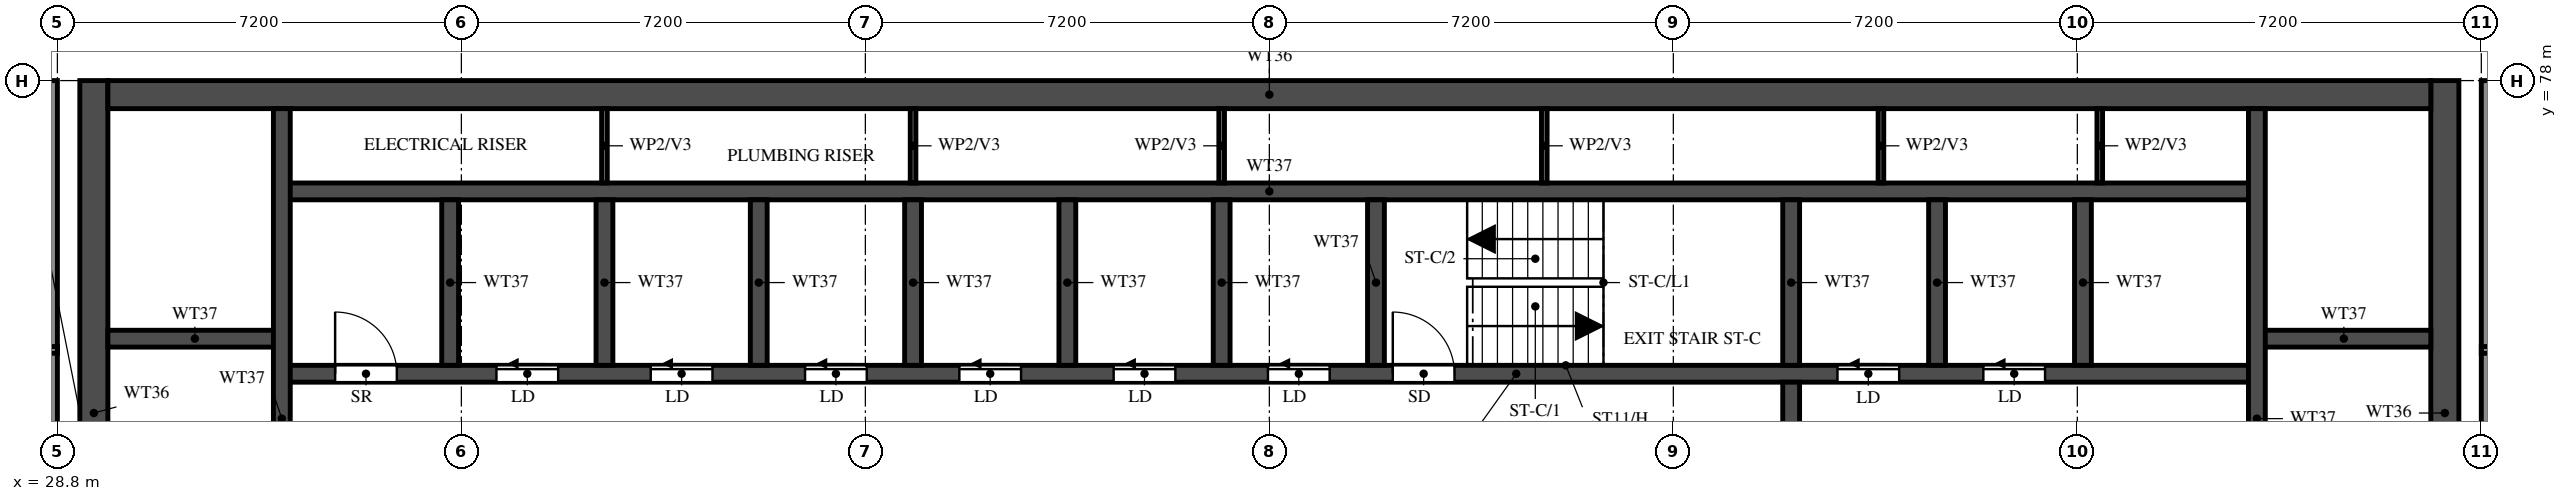
"""IFC4 building model, lengths in metres.
Left out: names, types, materials, properties, quantities, classifications, styles, units other than length and angle.
Written with IfcOpenShell. Run it as: python <this file> out.ifc"""

import sys

from ifc_helpers import new_model, si_unit, direction, frame, frame_2d, origin, place, context, subcontext, project, spatial, rectangle, extrude, element, fill, save


model = new_model("IFC4")
c1 = context("Model", 3, precision=1e-05, world=origin(), true_north=direction((0.0, 1.0)))
c2 = subcontext(c1, "Body", "Model", "MODEL_VIEW")
j1 = project(units=[si_unit("LENGTHUNIT", "METRE"), si_unit("PLANEANGLEUNIT", "RADIAN")], contexts=[c1])
p1 = place(None, origin())
s1 = spatial("IfcSite", under=j1, at=p1, CompositionType="ELEMENT")
p2 = place(p1, origin())
s2 = spatial("IfcBuilding", under=s1, at=p2, CompositionType="ELEMENT")
p3 = place(p2, frame((0.0, 0.0, 236.0)))
s3 = spatial("IfcBuildingStorey", under=s2, at=p3, CompositionType="ELEMENT", Elevation=236.0)
for number, where, z_axis, x_axis in (
    (1, (29.45, 66.15, 0.0), (0.0, 0.0, 1.0), (0.0, 1.0, 0.0)),
    (2, (71.35, 66.15, 0.0), (0.0, 0.0, 1.0), (0.0, 1.0, 0.0)),
):
    element("IfcWall", number, at=place(p3, frame(where, z_axis=z_axis, x_axis=x_axis)), inside=s3, PredefinedType="SHEAR", context=c2, shape_type="SweptSolid", body=[
        extrude(rectangle(XDim=11.85, YDim=0.5, at=frame_2d((5.925, 0.0))), origin(), (0.0, 0.0, 1.0), 3.22),
    ])
p4 = place(p3, frame((29.7, 77.75, 0.0), z_axis=(0.0, 0.0, 1.0), x_axis=(1.0, 0.0, 0.0)))
e3 = element("IfcWall", 3, at=p4, inside=s3, PredefinedType="SHEAR", context=c2, shape_type="SweptSolid", body=[
    extrude(rectangle(XDim=41.4, YDim=0.5, at=frame_2d((20.7, 0.0))), origin(), (0.0, 0.0, 1.0), 3.22),
])
p5 = place(p3, frame((32.8, 72.775, 0.0), z_axis=(0.0, 0.0, 1.0), x_axis=(1.0, 0.0, 0.0)))
e4 = element("IfcWall", 4, at=p5, inside=s3, PredefinedType="SHEAR", context=c2, shape_type="SweptSolid", body=[
    extrude(rectangle(XDim=35.2, YDim=0.3, at=frame_2d((17.6, 0.0))), origin(), (0.0, 0.0, 1.0), 3.22),
])
p6 = place(p5, frame((19.8, 0.0, 0.0)))
e5 = element("IfcOpeningElement", 5, at=p6, cuts=e4, PredefinedType="OPENING", context=c2, shape_type="SweptSolid", body=[
    extrude(rectangle(XDim=1.1, YDim=2.1, at=frame_2d((0.55, 1.05))), frame((0.0, 0.16, 0.0), z_axis=(0.0, -1.0, 0.0), x_axis=(1.0, 0.0, 0.0)), (0.0, 0.0, 1.0), 0.32),
])
p7 = place(p5, frame((27.725, 0.0, 0.0)))
e6 = element("IfcOpeningElement", 6, at=p7, cuts=e4, PredefinedType="OPENING", context=c2, shape_type="SweptSolid", body=[
    extrude(rectangle(XDim=1.1, YDim=2.1, at=frame_2d((0.55, 1.05))), frame((0.0, 0.16, 0.0), z_axis=(0.0, -1.0, 0.0), x_axis=(1.0, 0.0, 0.0)), (0.0, 0.0, 1.0), 0.32),
])
p8 = place(p5, frame((30.325, 0.0, 0.0)))
e7 = element("IfcOpeningElement", 7, at=p8, cuts=e4, PredefinedType="OPENING", context=c2, shape_type="SweptSolid", body=[
    extrude(rectangle(XDim=1.1, YDim=2.1, at=frame_2d((0.55, 1.05))), frame((0.0, 0.16, 0.0), z_axis=(0.0, -1.0, 0.0), x_axis=(1.0, 0.0, 0.0)), (0.0, 0.0, 1.0), 0.32),
])
p9 = place(p5, frame((3.825, 0.0, 0.0)))
e8 = element("IfcOpeningElement", 8, at=p9, cuts=e4, PredefinedType="OPENING", context=c2, shape_type="SweptSolid", body=[
    extrude(rectangle(XDim=1.1, YDim=2.1, at=frame_2d((0.55, 1.05))), frame((0.0, 0.16, 0.0), z_axis=(0.0, -1.0, 0.0), x_axis=(1.0, 0.0, 0.0)), (0.0, 0.0, 1.0), 0.32),
])
p10 = place(p5, frame((6.575, 0.0, 0.0)))
e9 = element("IfcOpeningElement", 9, at=p10, cuts=e4, PredefinedType="OPENING", context=c2, shape_type="SweptSolid", body=[
    extrude(rectangle(XDim=1.1, YDim=2.1, at=frame_2d((0.55, 1.05))), frame((0.0, 0.16, 0.0), z_axis=(0.0, -1.0, 0.0), x_axis=(1.0, 0.0, 0.0)), (0.0, 0.0, 1.0), 0.32),
])
p11 = place(p5, frame((9.325, 0.0, 0.0)))
e10 = element("IfcOpeningElement", 10, at=p11, cuts=e4, PredefinedType="OPENING", context=c2, shape_type="SweptSolid", body=[
    extrude(rectangle(XDim=1.1, YDim=2.1, at=frame_2d((0.55, 1.05))), frame((0.0, 0.16, 0.0), z_axis=(0.0, -1.0, 0.0), x_axis=(1.0, 0.0, 0.0)), (0.0, 0.0, 1.0), 0.32),
])
p12 = place(p5, frame((12.075, 0.0, 0.0)))
e11 = element("IfcOpeningElement", 11, at=p12, cuts=e4, PredefinedType="OPENING", context=c2, shape_type="SweptSolid", body=[
    extrude(rectangle(XDim=1.1, YDim=2.1, at=frame_2d((0.55, 1.05))), frame((0.0, 0.16, 0.0), z_axis=(0.0, -1.0, 0.0), x_axis=(1.0, 0.0, 0.0)), (0.0, 0.0, 1.0), 0.32),
])
p13 = place(p5, frame((14.825, 0.0, 0.0)))
e12 = element("IfcOpeningElement", 12, at=p13, cuts=e4, PredefinedType="OPENING", context=c2, shape_type="SweptSolid", body=[
    extrude(rectangle(XDim=1.1, YDim=2.1, at=frame_2d((0.55, 1.05))), frame((0.0, 0.16, 0.0), z_axis=(0.0, -1.0, 0.0), x_axis=(1.0, 0.0, 0.0)), (0.0, 0.0, 1.0), 0.32),
])
p14 = place(p5, frame((17.575, 0.0, 0.0)))
e13 = element("IfcOpeningElement", 13, at=p14, cuts=e4, PredefinedType="OPENING", context=c2, shape_type="SweptSolid", body=[
    extrude(rectangle(XDim=1.1, YDim=2.1, at=frame_2d((0.55, 1.05))), frame((0.0, 0.16, 0.0), z_axis=(0.0, -1.0, 0.0), x_axis=(1.0, 0.0, 0.0)), (0.0, 0.0, 1.0), 0.32),
])
p15 = place(p5, frame((0.95, 0.0, 0.0)))
e14 = element("IfcOpeningElement", 14, at=p15, cuts=e4, PredefinedType="OPENING", context=c2, shape_type="SweptSolid", body=[
    extrude(rectangle(XDim=1.1, YDim=2.1, at=frame_2d((0.55, 1.05))), frame((0.0, 0.16, 0.0), z_axis=(0.0, -1.0, 0.0), x_axis=(1.0, 0.0, 0.0)), (0.0, 0.0, 1.0), 0.32),
])
p16 = place(p3, frame((32.8, 76.025, 0.0), z_axis=(0.0, 0.0, 1.0), x_axis=(1.0, 0.0, 0.0)))
e15 = element("IfcWall", 15, at=p16, inside=s3, PredefinedType="SHEAR", context=c2, shape_type="SweptSolid", body=[
    extrude(rectangle(XDim=35.2, YDim=0.3, at=frame_2d((17.6, 0.0))), origin(), (0.0, 0.0, 1.0), 3.22),
])
for number, where, z_axis, x_axis in (
    (16, (29.7, 73.4, 0.0), (0.0, 0.0, 1.0), (1.0, 0.0, 0.0)),
    (17, (68.0, 73.4, 0.0), (0.0, 0.0, 1.0), (1.0, 0.0, 0.0)),
):
    element("IfcWall", number, at=place(p3, frame(where, z_axis=z_axis, x_axis=x_axis)), inside=s3, PredefinedType="SHEAR", context=c2, shape_type="SweptSolid", body=[
        extrude(rectangle(XDim=3.1, YDim=0.3, at=frame_2d((1.55, 0.0))), origin(), (0.0, 0.0, 1.0), 3.22),
    ])
p17 = place(p3, frame((32.8, 66.45, 0.0), z_axis=(0.0, 0.0, 1.0), x_axis=(0.0, 1.0, 0.0)))
e18 = element("IfcWall", 18, at=p17, inside=s3, PredefinedType="SHEAR", context=c2, shape_type="SweptSolid", body=[
    extrude(rectangle(XDim=11.05, YDim=0.3, at=frame_2d((5.525, 0.0))), origin(), (0.0, 0.0, 1.0), 3.22),
])
p18 = place(p3, frame((68.0, 66.45, 0.0), z_axis=(0.0, 0.0, 1.0), x_axis=(0.0, 1.0, 0.0)))
e19 = element("IfcWall", 19, at=p18, inside=s3, PredefinedType="SHEAR", context=c2, shape_type="SweptSolid", body=[
    extrude(rectangle(XDim=11.05, YDim=0.3, at=frame_2d((5.525, 0.0))), origin(), (0.0, 0.0, 1.0), 3.22),
])
p19 = place(p18, frame((0.15, 0.0, 0.0)))
e20 = element("IfcOpeningElement", 20, at=p19, cuts=e19, PredefinedType="OPENING", context=c2, shape_type="SweptSolid", body=[
    extrude(rectangle(XDim=1.1, YDim=2.1, at=frame_2d((0.55, 1.05))), frame((0.0, 0.16, 0.0), z_axis=(0.0, -1.0, 0.0), x_axis=(1.0, 0.0, 0.0)), (0.0, 0.0, 1.0), 0.32),
])
p20 = place(p3, frame((59.7, 66.45, 0.0), z_axis=(0.0, 0.0, 1.0), x_axis=(0.0, 1.0, 0.0)))
e21 = element("IfcWall", 21, at=p20, inside=s3, PredefinedType="SHEAR", context=c2, shape_type="SweptSolid", body=[
    extrude(rectangle(XDim=6.175, YDim=0.3, at=frame_2d((3.087, 0.0))), origin(), (0.0, 0.0, 1.0), 3.22),
])
p21 = place(p20, frame((3.85, 0.0, 0.0)))
e22 = element("IfcOpeningElement", 22, at=p21, cuts=e21, PredefinedType="OPENING", context=c2, shape_type="SweptSolid", body=[
    extrude(rectangle(XDim=1.2, YDim=2.1, at=frame_2d((0.6, 1.05))), frame((0.0, 0.16, 0.0), z_axis=(0.0, -1.0, 0.0), x_axis=(1.0, 0.0, 0.0)), (0.0, 0.0, 1.0), 0.32),
])
for number, where, z_axis, x_axis in (
    (23, (59.7, 72.925, 0.0), (0.0, 0.0, 1.0), (0.0, 1.0, 0.0)),
    (24, (35.8, 72.925, 0.0), (0.0, 0.0, 1.0), (0.0, 1.0, 0.0)),
    (25, (38.55, 72.925, 0.0), (0.0, 0.0, 1.0), (0.0, 1.0, 0.0)),
    (26, (41.3, 72.925, 0.0), (0.0, 0.0, 1.0), (0.0, 1.0, 0.0)),
    (27, (44.05, 72.925, 0.0), (0.0, 0.0, 1.0), (0.0, 1.0, 0.0)),
    (28, (46.8, 72.925, 0.0), (0.0, 0.0, 1.0), (0.0, 1.0, 0.0)),
    (29, (49.55, 72.925, 0.0), (0.0, 0.0, 1.0), (0.0, 1.0, 0.0)),
    (30, (52.3, 72.925, 0.0), (0.0, 0.0, 1.0), (0.0, 1.0, 0.0)),
    (31, (62.3, 72.925, 0.0), (0.0, 0.0, 1.0), (0.0, 1.0, 0.0)),
    (32, (64.9, 72.925, 0.0), (0.0, 0.0, 1.0), (0.0, 1.0, 0.0)),
):
    element("IfcWall", number, at=place(p3, frame(where, z_axis=z_axis, x_axis=x_axis)), inside=s3, PredefinedType="SHEAR", context=c2, shape_type="SweptSolid", body=[
        extrude(rectangle(XDim=2.95, YDim=0.3, at=frame_2d((1.475, 0.0))), origin(), (0.0, 0.0, 1.0), 3.22),
    ])
for number, where, z_axis, x_axis in (
    (33, (38.55, 76.175, 0.0), (0.0, 0.0, 1.0), (0.0, 1.0, 0.0)),
    (34, (44.05, 76.175, 0.0), (0.0, 0.0, 1.0), (0.0, 1.0, 0.0)),
    (35, (49.55, 76.175, 0.0), (0.0, 0.0, 1.0), (0.0, 1.0, 0.0)),
    (36, (55.3, 76.175, 0.0), (0.0, 0.0, 1.0), (0.0, 1.0, 0.0)),
    (37, (61.3, 76.175, 0.0), (0.0, 0.0, 1.0), (0.0, 1.0, 0.0)),
    (38, (65.2, 76.175, 0.0), (0.0, 0.0, 1.0), (0.0, 1.0, 0.0)),
):
    element("IfcWall", number, at=place(p3, frame(where, z_axis=z_axis, x_axis=x_axis)), inside=s3, PredefinedType="PARTITIONING", context=c2, shape_type="SweptSolid", body=[
        extrude(rectangle(XDim=1.325, YDim=0.1, at=frame_2d((0.663, 0.0))), origin(), (0.0, 0.0, 1.0), 3.22),
    ])
for number, where, z_axis, x_axis in (
    (39, (28.7, 62.4, 0.0), (0.0, 0.0, 1.0), (0.0, 1.0, 0.0)),
    (40, (72.1, 62.4, 0.0), (0.0, 0.0, 1.0), (0.0, 1.0, 0.0)),
):
    element("IfcWall", number, at=place(p3, frame(where, z_axis=z_axis, x_axis=x_axis)), inside=s3, PredefinedType="SOLIDWALL", context=c2, shape_type="SweptSolid", body=[
        extrude(rectangle(XDim=15.6, YDim=0.2, at=frame_2d((7.8, 0.0))), origin(), (0.0, 0.0, 1.0), 3.22),
    ])
p22 = place(p3, frame((18.525, 73.2, 0.0), z_axis=(0.0, 0.0, 1.0), x_axis=(1.0, 0.0, 0.0)))
e41 = element("IfcWall", 41, at=p22, inside=s3, PredefinedType="PARTITIONING", context=c2, shape_type="SweptSolid", body=[
    extrude(rectangle(XDim=10.275, YDim=0.12, at=frame_2d((5.138, 0.0))), origin(), (0.0, 0.0, 1.0), 2.32),
])
p23 = place(p22, frame((5.275, 0.0, 0.0)))
e42 = element("IfcOpeningElement", 42, at=p23, cuts=e41, PredefinedType="OPENING", context=c2, shape_type="SweptSolid", body=[
    extrude(rectangle(XDim=0.9, YDim=2.1, at=frame_2d((0.45, 1.05))), frame((0.0, 0.07, 0.0), z_axis=(0.0, -1.0, 0.0), x_axis=(1.0, 0.0, 0.0)), (0.0, 0.0, 1.0), 0.14),
])
p24 = place(p3, frame((72.0, 73.2, 0.0), z_axis=(0.0, 0.0, 1.0), x_axis=(1.0, 0.0, 0.0)))
e43 = element("IfcWall", 43, at=p24, inside=s3, PredefinedType="PARTITIONING", context=c2, shape_type="SweptSolid", body=[
    extrude(rectangle(XDim=10.275, YDim=0.12, at=frame_2d((5.137, 0.0))), origin(), (0.0, 0.0, 1.0), 2.32),
])
p25 = place(p24, frame((4.1, 0.0, 0.0)))
e44 = element("IfcOpeningElement", 44, at=p25, cuts=e43, PredefinedType="OPENING", context=c2, shape_type="SweptSolid", body=[
    extrude(rectangle(XDim=0.9, YDim=2.1, at=frame_2d((0.45, 1.05))), frame((0.0, 0.07, 0.0), z_axis=(0.0, -1.0, 0.0), x_axis=(1.0, 0.0, 0.0)), (0.0, 0.0, 1.0), 0.14),
])
p26 = place(p6, origin())
e45 = element("IfcDoor", 45, at=p26, inside=s3, OperationType="SINGLE_SWING_LEFT", PredefinedType="DOOR", context=c2, shape_type="SweptSolid", body=[
    extrude(rectangle(XDim=1.1, YDim=2.1, at=frame_2d((0.55, 1.05))), frame((0.0, 0.025, 0.0), z_axis=(0.0, -1.0, 0.0), x_axis=(1.0, 0.0, 0.0)), (0.0, 0.0, 1.0), 0.05),
])
fill(e5, e45)
p27 = place(p7, origin())
e46 = element("IfcDoor", 46, at=p27, inside=s3, OperationType="SLIDING_TO_LEFT", PredefinedType="DOOR", context=c2, shape_type="SweptSolid", body=[
    extrude(rectangle(XDim=1.1, YDim=2.1, at=frame_2d((0.55, 1.05))), frame((0.0, 0.025, 0.0), z_axis=(0.0, -1.0, 0.0), x_axis=(1.0, 0.0, 0.0)), (0.0, 0.0, 1.0), 0.05),
])
fill(e6, e46)
p28 = place(p8, origin())
e47 = element("IfcDoor", 47, at=p28, inside=s3, OperationType="SLIDING_TO_LEFT", PredefinedType="DOOR", context=c2, shape_type="SweptSolid", body=[
    extrude(rectangle(XDim=1.1, YDim=2.1, at=frame_2d((0.55, 1.05))), frame((0.0, 0.025, 0.0), z_axis=(0.0, -1.0, 0.0), x_axis=(1.0, 0.0, 0.0)), (0.0, 0.0, 1.0), 0.05),
])
fill(e7, e47)
p29 = place(p9, origin())
e48 = element("IfcDoor", 48, at=p29, inside=s3, OperationType="SLIDING_TO_LEFT", PredefinedType="DOOR", context=c2, shape_type="SweptSolid", body=[
    extrude(rectangle(XDim=1.1, YDim=2.1, at=frame_2d((0.55, 1.05))), frame((0.0, 0.025, 0.0), z_axis=(0.0, -1.0, 0.0), x_axis=(1.0, 0.0, 0.0)), (0.0, 0.0, 1.0), 0.05),
])
fill(e8, e48)
p30 = place(p10, origin())
e49 = element("IfcDoor", 49, at=p30, inside=s3, OperationType="SLIDING_TO_LEFT", PredefinedType="DOOR", context=c2, shape_type="SweptSolid", body=[
    extrude(rectangle(XDim=1.1, YDim=2.1, at=frame_2d((0.55, 1.05))), frame((0.0, 0.025, 0.0), z_axis=(0.0, -1.0, 0.0), x_axis=(1.0, 0.0, 0.0)), (0.0, 0.0, 1.0), 0.05),
])
fill(e9, e49)
p31 = place(p11, origin())
e50 = element("IfcDoor", 50, at=p31, inside=s3, OperationType="SLIDING_TO_LEFT", PredefinedType="DOOR", context=c2, shape_type="SweptSolid", body=[
    extrude(rectangle(XDim=1.1, YDim=2.1, at=frame_2d((0.55, 1.05))), frame((0.0, 0.025, 0.0), z_axis=(0.0, -1.0, 0.0), x_axis=(1.0, 0.0, 0.0)), (0.0, 0.0, 1.0), 0.05),
])
fill(e10, e50)
p32 = place(p12, origin())
e51 = element("IfcDoor", 51, at=p32, inside=s3, OperationType="SLIDING_TO_LEFT", PredefinedType="DOOR", context=c2, shape_type="SweptSolid", body=[
    extrude(rectangle(XDim=1.1, YDim=2.1, at=frame_2d((0.55, 1.05))), frame((0.0, 0.025, 0.0), z_axis=(0.0, -1.0, 0.0), x_axis=(1.0, 0.0, 0.0)), (0.0, 0.0, 1.0), 0.05),
])
fill(e11, e51)
p33 = place(p13, origin())
e52 = element("IfcDoor", 52, at=p33, inside=s3, OperationType="SLIDING_TO_LEFT", PredefinedType="DOOR", context=c2, shape_type="SweptSolid", body=[
    extrude(rectangle(XDim=1.1, YDim=2.1, at=frame_2d((0.55, 1.05))), frame((0.0, 0.025, 0.0), z_axis=(0.0, -1.0, 0.0), x_axis=(1.0, 0.0, 0.0)), (0.0, 0.0, 1.0), 0.05),
])
fill(e12, e52)
p34 = place(p14, origin())
e53 = element("IfcDoor", 53, at=p34, inside=s3, OperationType="SLIDING_TO_LEFT", PredefinedType="DOOR", context=c2, shape_type="SweptSolid", body=[
    extrude(rectangle(XDim=1.1, YDim=2.1, at=frame_2d((0.55, 1.05))), frame((0.0, 0.025, 0.0), z_axis=(0.0, -1.0, 0.0), x_axis=(1.0, 0.0, 0.0)), (0.0, 0.0, 1.0), 0.05),
])
fill(e13, e53)
p35 = place(p15, origin())
e54 = element("IfcDoor", 54, at=p35, inside=s3, OperationType="SINGLE_SWING_LEFT", PredefinedType="DOOR", context=c2, shape_type="SweptSolid", body=[
    extrude(rectangle(XDim=1.1, YDim=2.1, at=frame_2d((0.55, 1.05))), frame((0.0, 0.025, 0.0), z_axis=(0.0, -1.0, 0.0), x_axis=(1.0, 0.0, 0.0)), (0.0, 0.0, 1.0), 0.05),
])
fill(e14, e54)
save(model, sys.argv[1])
